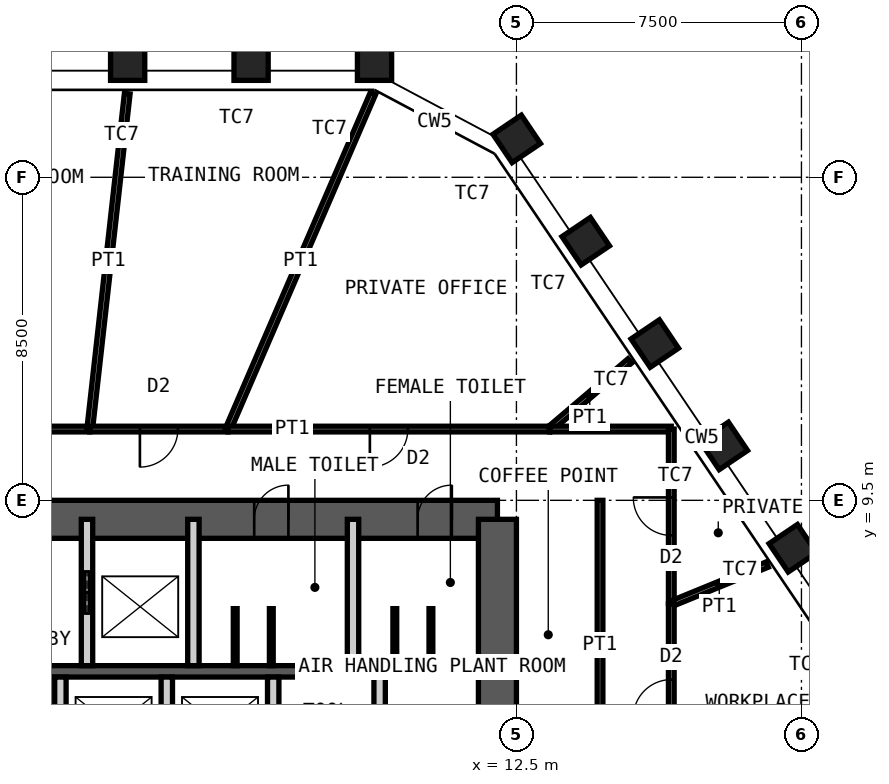
"""IFC4 building model, lengths in metres.
Left out: names, types, materials, properties, quantities, classifications, styles, units other than length and angle.
Written with IfcOpenShell. Run it as: python <this file> out.ifc"""

import sys

from ifc_helpers import new_model, si_unit, direction, frame, frame_2d, origin, origin_2d, place, context, subcontext, project, spatial, rectangle, hollow_rectangle, extrude, element, fill, save


model = new_model("IFC4")
c1 = context("Model", 3, precision=1e-05, world=origin(), true_north=direction((0.0, 1.0)))
c2 = subcontext(c1, "Body", "Model", "MODEL_VIEW")
j1 = project(units=[si_unit("LENGTHUNIT", "METRE"), si_unit("PLANEANGLEUNIT", "RADIAN")], contexts=[c1])
p1 = place(None, origin())
s1 = spatial("IfcSite", under=j1, at=p1, CompositionType="ELEMENT")
p2 = place(p1, origin())
s2 = spatial("IfcBuilding", under=s1, at=p2, CompositionType="ELEMENT")
p3 = place(p2, frame((0.0, 0.0, 283.0)))
s3 = spatial("IfcBuildingStorey", under=s2, at=p3, CompositionType="ELEMENT", Elevation=283.0)
for number, where, z_axis, x_axis in (
    (1, (2.27, 21.0, 0.0), (0.0, 0.0, 1.0), (-1.0, 0.0, 0.0)),
    (2, (5.518, 21.0, 0.0), (0.0, 0.0, 1.0), (-1.0, 0.0, 0.0)),
    (3, (8.766, 21.0, 0.0), (0.0, 0.0, 1.0), (-1.0, 0.0, 0.0)),
    (4, (12.508, 19.01, 0.0), (0.0, 0.0, 1.0), (-0.559, 0.829, 0.0)),
    (5, (14.324, 16.318, 0.0), (0.0, 0.0, 1.0), (-0.559, 0.829, 0.0)),
    (6, (16.141, 13.625, 0.0), (0.0, 0.0, 1.0), (-0.559, 0.829, 0.0)),
    (7, (17.957, 10.932, 0.0), (0.0, 0.0, 1.0), (-0.559, 0.829, 0.0)),
    (8, (19.773, 8.239, 0.0), (0.0, 0.0, 1.0), (-0.559, 0.829, 0.0)),
):
    element("IfcColumn", number, at=place(p3, frame(where, z_axis=z_axis, x_axis=x_axis)), inside=s3, PredefinedType="COLUMN", context=c2, shape_type="SweptSolid", body=[
        extrude(hollow_rectangle(XDim=0.9, YDim=0.9, WallThickness=0.06, at=origin_2d()), origin(), (0.0, 0.0, 1.0), 4.2),
    ])
p4 = place(p3, frame((-12.0, 9.0, 0.0), z_axis=(0.0, 0.0, 1.0), x_axis=(1.0, 0.0, 0.0)))
e9 = element("IfcWall", 9, at=p4, inside=s3, PredefinedType="SHEAR", context=c2, shape_type="SweptSolid", body=[
    extrude(rectangle(XDim=24.0, YDim=1.0, at=frame_2d((12.0, 0.0))), origin(), (0.0, 0.0, 1.0), 4.2),
])
p5 = place(p4, frame((10.4, 0.0, 0.0)))
e10 = element("IfcOpeningElement", 10, at=p5, cuts=e9, PredefinedType="OPENING", context=c2, shape_type="SweptSolid", body=[
    extrude(rectangle(XDim=1.0, YDim=2.1, at=frame_2d((0.5, 1.05))), frame((0.0, 0.51, 0.0), z_axis=(0.0, -1.0, 0.0), x_axis=(1.0, 0.0, 0.0)), (0.0, 0.0, 1.0), 1.02),
])
p6 = place(p4, frame((17.6, 0.0, 0.0)))
e11 = element("IfcOpeningElement", 11, at=p6, cuts=e9, PredefinedType="OPENING", context=c2, shape_type="SweptSolid", body=[
    extrude(rectangle(XDim=0.9, YDim=2.1, at=frame_2d((0.45, 1.05))), frame((0.0, 0.51, 0.0), z_axis=(0.0, -1.0, 0.0), x_axis=(1.0, 0.0, 0.0)), (0.0, 0.0, 1.0), 1.02),
])
p7 = place(p4, frame((21.9, 0.0, 0.0)))
e12 = element("IfcOpeningElement", 12, at=p7, cuts=e9, PredefinedType="OPENING", context=c2, shape_type="SweptSolid", body=[
    extrude(rectangle(XDim=0.9, YDim=2.1, at=frame_2d((0.45, 1.05))), frame((0.0, 0.51, 0.0), z_axis=(0.0, -1.0, 0.0), x_axis=(1.0, 0.0, 0.0)), (0.0, 0.0, 1.0), 1.02),
])
p8 = place(p3, frame((12.0, -9.0, 0.0), z_axis=(0.0, 0.0, 1.0), x_axis=(0.0, 1.0, 0.0)))
e13 = element("IfcWall", 13, at=p8, inside=s3, PredefinedType="SHEAR", context=c2, shape_type="SweptSolid", body=[
    extrude(rectangle(XDim=18.0, YDim=1.0, at=frame_2d((9.0, 0.0))), origin(), (0.0, 0.0, 1.0), 4.2),
])
p9 = place(p8, frame((8.1, 0.0, 0.0)))
e14 = element("IfcOpeningElement", 14, at=p9, cuts=e13, PredefinedType="OPENING", context=c2, shape_type="SweptSolid", body=[
    extrude(rectangle(XDim=1.8, YDim=2.1, at=frame_2d((0.9, 1.05))), frame((0.0, 0.51, 0.0), z_axis=(0.0, -1.0, 0.0), x_axis=(1.0, 0.0, 0.0)), (0.0, 0.0, 1.0), 1.02),
])
p10 = place(p3, frame((-12.0, 5.0, 0.0), z_axis=(0.0, 0.0, 1.0), x_axis=(1.0, 0.0, 0.0)))
e15 = element("IfcWall", 15, at=p10, inside=s3, PredefinedType="SHEAR", context=c2, shape_type="SweptSolid", body=[
    extrude(rectangle(XDim=24.0, YDim=0.3, at=frame_2d((12.0, 0.0))), origin(), (0.0, 0.0, 1.0), 4.2),
])
p11 = place(p3, frame((1.2, 5.15, 0.0), z_axis=(0.0, 0.0, 1.0), x_axis=(0.0, 1.0, 0.0)))
e16 = element("IfcWall", 16, at=p11, inside=s3, PredefinedType="PARTITIONING", context=c2, shape_type="SweptSolid", body=[
    extrude(rectangle(XDim=3.85, YDim=0.3, at=frame_2d((1.925, 0.0))), origin(), (0.0, 0.0, 1.0), 3.98),
])
p12 = place(p11, frame((1.375, 0.0, 0.0)))
e17 = element("IfcOpeningElement", 17, at=p12, cuts=e16, PredefinedType="OPENING", context=c2, shape_type="SweptSolid", body=[
    extrude(rectangle(XDim=1.1, YDim=2.4, at=frame_2d((0.55, 1.2))), frame((0.0, 0.16, 0.0), z_axis=(0.0, -1.0, 0.0), x_axis=(1.0, 0.0, 0.0)), (0.0, 0.0, 1.0), 0.32),
])
for number, where, z_axis, x_axis in (
    (18, (4.0, 5.15, 0.0), (0.0, 0.0, 1.0), (0.0, 1.0, 0.0)),
    (19, (8.2, 5.15, 0.0), (0.0, 0.0, 1.0), (0.0, 1.0, 0.0)),
):
    element("IfcWall", number, at=place(p3, frame(where, z_axis=z_axis, x_axis=x_axis)), inside=s3, PredefinedType="PARTITIONING", context=c2, shape_type="SweptSolid", body=[
        extrude(rectangle(XDim=3.85, YDim=0.3, at=frame_2d((1.925, 0.0))), origin(), (0.0, 0.0, 1.0), 3.98),
    ])
for number, where, z_axis, x_axis in (
    (20, (0.5, 2.2, 0.0), (0.0, 0.0, 1.0), (0.0, 1.0, 0.0)),
    (21, (3.3, 2.2, 0.0), (0.0, 0.0, 1.0), (0.0, 1.0, 0.0)),
    (22, (6.1, 2.2, 0.0), (0.0, 0.0, 1.0), (0.0, 1.0, 0.0)),
    (23, (8.9, 2.2, 0.0), (0.0, 0.0, 1.0), (0.0, 1.0, 0.0)),
):
    element("IfcWall", number, at=place(p3, frame(where, z_axis=z_axis, x_axis=x_axis)), inside=s3, PredefinedType="PARTITIONING", context=c2, shape_type="SweptSolid", body=[
        extrude(rectangle(XDim=2.65, YDim=0.3, at=frame_2d((1.325, 0.0))), origin(), (0.0, 0.0, 1.0), 3.98),
    ])
for number, where, z_axis, x_axis in (
    (24, (5.1, 5.15, 0.0), (0.0, 0.0, 1.0), (0.0, 1.0, 0.0)),
    (25, (6.05, 5.15, 0.0), (0.0, 0.0, 1.0), (0.0, 1.0, 0.0)),
    (26, (9.3, 5.15, 0.0), (0.0, 0.0, 1.0), (0.0, 1.0, 0.0)),
    (27, (10.25, 5.15, 0.0), (0.0, 0.0, 1.0), (0.0, 1.0, 0.0)),
):
    element("IfcWall", number, at=place(p3, frame(where, z_axis=z_axis, x_axis=x_axis)), inside=s3, PredefinedType="PARTITIONING", context=c2, shape_type="SweptSolid", body=[
        extrude(rectangle(XDim=1.5, YDim=0.1, at=frame_2d((0.75, 0.0))), origin(), (0.0, 0.0, 1.0), 2.1),
    ])
p13 = place(p3, frame((-2.368, 11.375, 0.0), z_axis=(0.0, 0.0, 1.0), x_axis=(1.0, 0.0, 0.0)))
e28 = element("IfcWall", 28, at=p13, inside=s3, PredefinedType="PARTITIONING", context=c2, shape_type="SweptSolid", body=[
    extrude(rectangle(XDim=3.64, YDim=0.15, at=frame_2d((1.82, 0.0))), origin(), (0.0, 0.0, 1.0), 4.03),
])
p14 = place(p13, frame((1.32, 0.0, 0.0)))
e29 = element("IfcOpeningElement", 29, at=p14, cuts=e28, PredefinedType="OPENING", context=c2, shape_type="SweptSolid", body=[
    extrude(rectangle(XDim=1.0, YDim=2.4, at=frame_2d((0.5, 1.2))), frame((0.0, 0.085, 0.0), z_axis=(0.0, -1.0, 0.0), x_axis=(1.0, 0.0, 0.0)), (0.0, 0.0, 1.0), 0.17),
])
p15 = place(p3, frame((2.259, 20.201, 0.0), z_axis=(0.0, 0.0, 1.0), x_axis=(-0.11111945026, -0.993807057619, 0.0)))
e30 = element("IfcWall", 30, at=p15, inside=s3, PredefinedType="PARTITIONING", context=c2, shape_type="SweptSolid", body=[
    extrude(rectangle(XDim=8.881, YDim=0.15, at=frame_2d((4.44, 0.0))), origin(), (0.0, 0.0, 1.0), 3.33),
])
p16 = place(p3, frame((1.272, 11.375, 0.0), z_axis=(0.0, 0.0, 1.0), x_axis=(1.0, 0.0, 0.0)))
e31 = element("IfcWall", 31, at=p16, inside=s3, PredefinedType="PARTITIONING", context=c2, shape_type="SweptSolid", body=[
    extrude(rectangle(XDim=3.64, YDim=0.15, at=frame_2d((1.82, 0.0))), origin(), (0.0, 0.0, 1.0), 4.03),
])
p17 = place(p16, frame((1.32, 0.0, 0.0)))
e32 = element("IfcOpeningElement", 32, at=p17, cuts=e31, PredefinedType="OPENING", context=c2, shape_type="SweptSolid", body=[
    extrude(rectangle(XDim=1.0, YDim=2.4, at=frame_2d((0.5, 1.2))), frame((0.0, 0.085, 0.0), z_axis=(0.0, -1.0, 0.0), x_axis=(1.0, 0.0, 0.0)), (0.0, 0.0, 1.0), 0.17),
])
p18 = place(p3, frame((8.726, 20.208, 0.0), z_axis=(0.0, 0.0, 1.0), x_axis=(-0.396444279146, -0.918058785445, 0.0)))
e33 = element("IfcWall", 33, at=p18, inside=s3, PredefinedType="PARTITIONING", context=c2, shape_type="SweptSolid", body=[
    extrude(rectangle(XDim=9.622, YDim=0.15, at=frame_2d((4.811, 0.0))), origin(), (0.0, 0.0, 1.0), 2.93),
])
p19 = place(p3, frame((4.912, 11.375, 0.0), z_axis=(0.0, 0.0, 1.0), x_axis=(1.0, 0.0, 0.0)))
e34 = element("IfcWall", 34, at=p19, inside=s3, PredefinedType="PARTITIONING", context=c2, shape_type="SweptSolid", body=[
    extrude(rectangle(XDim=8.463, YDim=0.15, at=frame_2d((4.231, 0.0))), origin(), (0.0, 0.0, 1.0), 4.03),
])
p20 = place(p19, frame((3.731, 0.0, 0.0)))
e35 = element("IfcOpeningElement", 35, at=p20, cuts=e34, PredefinedType="OPENING", context=c2, shape_type="SweptSolid", body=[
    extrude(rectangle(XDim=1.0, YDim=2.4, at=frame_2d((0.5, 1.2))), frame((0.0, 0.085, 0.0), z_axis=(0.0, -1.0, 0.0), x_axis=(1.0, 0.0, 0.0)), (0.0, 0.0, 1.0), 0.17),
])
p21 = place(p3, frame((15.484, 13.169, 0.0), z_axis=(0.0, 0.0, 1.0), x_axis=(-0.761734753955, -0.647889006403, 0.0)))
e36 = element("IfcWall", 36, at=p21, inside=s3, PredefinedType="PARTITIONING", context=c2, shape_type="SweptSolid", body=[
    extrude(rectangle(XDim=2.769, YDim=0.15, at=frame_2d((1.384, 0.0))), origin(), (0.0, 0.0, 1.0), 3.33),
])
p22 = place(p3, frame((13.375, 11.375, 0.0), z_axis=(0.0, 0.0, 1.0), x_axis=(1.0, 0.0, 0.0)))
e37 = element("IfcWall", 37, at=p22, inside=s3, PredefinedType="PARTITIONING", context=c2, shape_type="SweptSolid", body=[
    extrude(rectangle(XDim=3.2, YDim=0.15, at=frame_2d((1.6, 0.0))), origin(), (0.0, 0.0, 1.0), 4.03),
])
p23 = place(p3, frame((16.575, 11.375, 0.0), z_axis=(0.0, 0.0, 1.0), x_axis=(0.0, -1.0, 0.0)))
e38 = element("IfcWall", 38, at=p23, inside=s3, PredefinedType="PARTITIONING", context=c2, shape_type="SweptSolid", body=[
    extrude(rectangle(XDim=4.597, YDim=0.15, at=frame_2d((2.299, 0.0))), origin(), (0.0, 0.0, 1.0), 4.03),
])
p24 = place(p23, frame((1.799, 0.0, 0.0)))
e39 = element("IfcOpeningElement", 39, at=p24, cuts=e38, PredefinedType="OPENING", context=c2, shape_type="SweptSolid", body=[
    extrude(rectangle(XDim=1.0, YDim=2.4, at=frame_2d((0.5, 1.2))), frame((0.0, 0.085, 0.0), z_axis=(0.0, -1.0, 0.0), x_axis=(1.0, 0.0, 0.0)), (0.0, 0.0, 1.0), 0.17),
])
p25 = place(p3, frame((19.1, 7.81, 0.0), z_axis=(0.0, 0.0, 1.0), x_axis=(-0.925616791812, -0.378462091518, 0.0)))
e40 = element("IfcWall", 40, at=p25, inside=s3, PredefinedType="PARTITIONING", context=c2, shape_type="SweptSolid", body=[
    extrude(rectangle(XDim=2.728, YDim=0.15, at=frame_2d((1.364, 0.0))), origin(), (0.0, 0.0, 1.0), 3.33),
])
p26 = place(p3, frame((16.575, 6.778, 0.0), z_axis=(0.0, 0.0, 1.0), x_axis=(0.0, -1.0, 0.0)))
e41 = element("IfcWall", 41, at=p26, inside=s3, PredefinedType="PARTITIONING", context=c2, shape_type="SweptSolid", body=[
    extrude(rectangle(XDim=4.99, YDim=0.15, at=frame_2d((2.495, 0.0))), origin(), (0.0, 0.0, 1.0), 4.03),
])
p27 = place(p26, frame((1.995, 0.0, 0.0)))
e42 = element("IfcOpeningElement", 42, at=p27, cuts=e41, PredefinedType="OPENING", context=c2, shape_type="SweptSolid", body=[
    extrude(rectangle(XDim=1.0, YDim=2.4, at=frame_2d((0.5, 1.2))), frame((0.0, 0.085, 0.0), z_axis=(0.0, -1.0, 0.0), x_axis=(1.0, 0.0, 0.0)), (0.0, 0.0, 1.0), 0.17),
])
p28 = place(p3, frame((14.7, 1.9, 0.0), z_axis=(0.0, 0.0, 1.0), x_axis=(0.0, 1.0, 0.0)))
e43 = element("IfcWall", 43, at=p28, inside=s3, PredefinedType="PARTITIONING", context=c2, shape_type="SweptSolid", body=[
    extrude(rectangle(XDim=7.6, YDim=0.15, at=frame_2d((3.8, 0.0))), origin(), (0.0, 0.0, 1.0), 4.03),
])
p29 = place(p6, origin())
e44 = element("IfcDoor", 44, at=p29, inside=s3, OperationType="SINGLE_SWING_LEFT", PredefinedType="DOOR", context=c2, shape_type="SweptSolid", body=[
    extrude(rectangle(XDim=0.9, YDim=2.1, at=frame_2d((0.45, 1.05))), frame((0.0, 0.025, 0.0), z_axis=(0.0, -1.0, 0.0), x_axis=(1.0, 0.0, 0.0)), (0.0, 0.0, 1.0), 0.05),
])
fill(e11, e44)
p30 = place(p7, origin())
e45 = element("IfcDoor", 45, at=p30, inside=s3, OperationType="SINGLE_SWING_LEFT", PredefinedType="DOOR", context=c2, shape_type="SweptSolid", body=[
    extrude(rectangle(XDim=0.9, YDim=2.1, at=frame_2d((0.45, 1.05))), frame((0.0, 0.025, 0.0), z_axis=(0.0, -1.0, 0.0), x_axis=(1.0, 0.0, 0.0)), (0.0, 0.0, 1.0), 0.05),
])
fill(e12, e45)
p31 = place(p12, origin())
e46 = element("IfcDoor", 46, at=p31, inside=s3, OperationType="DOUBLE_DOOR_SLIDING", PredefinedType="DOOR", context=c2, shape_type="SweptSolid", body=[
    extrude(rectangle(XDim=1.1, YDim=2.4, at=frame_2d((0.55, 1.2))), frame((0.0, 0.025, 0.0), z_axis=(0.0, -1.0, 0.0), x_axis=(1.0, 0.0, 0.0)), (0.0, 0.0, 1.0), 0.05),
])
fill(e17, e46)
p32 = place(p17, origin())
e47 = element("IfcDoor", 47, at=p32, inside=s3, OperationType="SINGLE_SWING_LEFT", PredefinedType="DOOR", context=c2, shape_type="SweptSolid", body=[
    extrude(rectangle(XDim=1.0, YDim=2.4, at=frame_2d((0.5, 1.2))), frame((0.0, 0.025, 0.0), z_axis=(0.0, -1.0, 0.0), x_axis=(1.0, 0.0, 0.0)), (0.0, 0.0, 1.0), 0.05),
])
fill(e32, e47)
p33 = place(p20, origin())
e48 = element("IfcDoor", 48, at=p33, inside=s3, OperationType="SINGLE_SWING_LEFT", PredefinedType="DOOR", context=c2, shape_type="SweptSolid", body=[
    extrude(rectangle(XDim=1.0, YDim=2.4, at=frame_2d((0.5, 1.2))), frame((0.0, 0.025, 0.0), z_axis=(0.0, -1.0, 0.0), x_axis=(1.0, 0.0, 0.0)), (0.0, 0.0, 1.0), 0.05),
])
fill(e35, e48)
p34 = place(p24, origin())
e49 = element("IfcDoor", 49, at=p34, inside=s3, OperationType="SINGLE_SWING_LEFT", PredefinedType="DOOR", context=c2, shape_type="SweptSolid", body=[
    extrude(rectangle(XDim=1.0, YDim=2.4, at=frame_2d((0.5, 1.2))), frame((0.0, 0.025, 0.0), z_axis=(0.0, -1.0, 0.0), x_axis=(1.0, 0.0, 0.0)), (0.0, 0.0, 1.0), 0.05),
])
fill(e39, e49)
p35 = place(p27, origin())
e50 = element("IfcDoor", 50, at=p35, inside=s3, OperationType="SINGLE_SWING_RIGHT", PredefinedType="DOOR", context=c2, shape_type="SweptSolid", body=[
    extrude(rectangle(XDim=1.0, YDim=2.4, at=frame_2d((0.5, 1.2))), frame((0.0, 0.025, 0.0), z_axis=(0.0, -1.0, 0.0), x_axis=(1.0, 0.0, 0.0)), (0.0, 0.0, 1.0), 0.05),
])
fill(e42, e50)
save(model, sys.argv[1])
